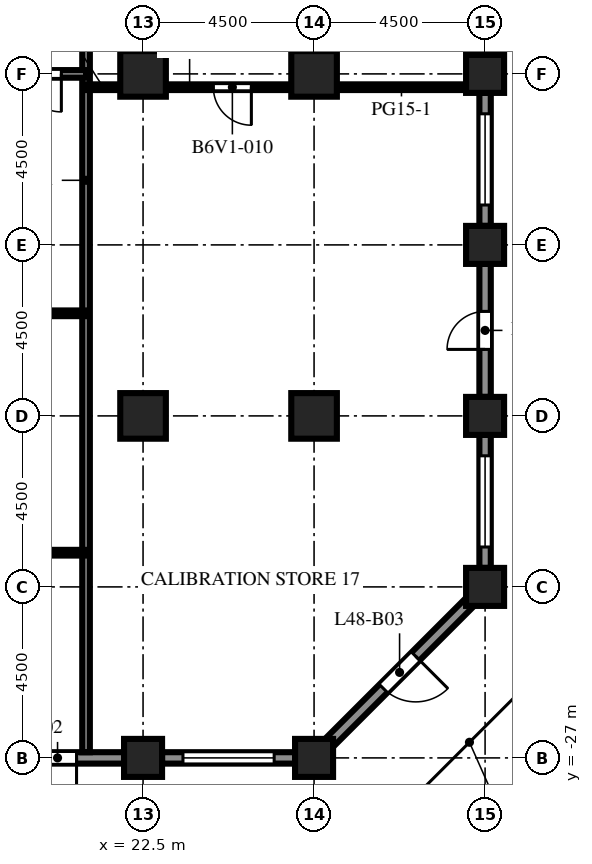
"""IFC4 building model, lengths in metres.
Left out: names, types, materials, properties, quantities, classifications, styles, units other than length and angle.
Written with IfcOpenShell. Run it as: python <this file> out.ifc"""

import sys

from ifc_helpers import new_model, si_unit, direction, frame, frame_2d, origin, origin_2d, place, context, subcontext, project, spatial, rectangle, extrude, element, fill, save


model = new_model("IFC4")
c1 = context("Model", 3, precision=1e-05, world=origin(), true_north=direction((0.0, 1.0)))
c2 = subcontext(c1, "Body", "Model", "MODEL_VIEW")
j1 = project(units=[si_unit("LENGTHUNIT", "METRE"), si_unit("PLANEANGLEUNIT", "RADIAN")], contexts=[c1])
p1 = place(None, origin())
s1 = spatial("IfcSite", under=j1, at=p1, CompositionType="ELEMENT")
p2 = place(p1, origin())
s2 = spatial("IfcBuilding", under=s1, at=p2, CompositionType="ELEMENT")
p3 = place(p2, frame((0.0, 0.0, 212.0)))
s3 = spatial("IfcBuildingStorey", under=s2, at=p3, CompositionType="ELEMENT", Elevation=212.0)
for number, where, z_axis, x_axis in (
    (1, (22.5, -27.0, 0.0), (0.0, 0.0, 1.0), (1.0, 0.0, 0.0)),
    (2, (27.0, -27.0, 0.0), (0.0, 0.0, 1.0), (1.0, 0.0, 0.0)),
    (3, (31.5, -22.5, 0.0), (0.0, 0.0, 1.0), (1.0, 0.0, 0.0)),
    (4, (31.5, -18.0, 0.0), (0.0, 0.0, 1.0), (1.0, 0.0, 0.0)),
    (5, (31.5, -13.5, 0.0), (0.0, 0.0, 1.0), (1.0, 0.0, 0.0)),
    (6, (31.5, -9.0, 0.0), (0.0, 0.0, 1.0), (1.0, 0.0, 0.0)),
):
    element("IfcColumn", number, at=place(p3, frame(where, z_axis=z_axis, x_axis=x_axis)), inside=s3, PredefinedType="COLUMN", context=c2, shape_type="SweptSolid", body=[
        extrude(rectangle(XDim=1.0, YDim=1.0, at=origin_2d()), origin(), (0.0, 0.0, 1.0), 4.1),
    ])
for number, where, z_axis, x_axis in (
    (7, (22.5, -18.0, 0.0), (0.0, 0.0, 1.0), (1.0, 0.0, 0.0)),
    (8, (22.5, -9.0, 0.0), (0.0, 0.0, 1.0), (1.0, 0.0, 0.0)),
    (9, (27.0, -18.0, 0.0), (0.0, 0.0, 1.0), (1.0, 0.0, 0.0)),
    (10, (27.0, -9.0, 0.0), (0.0, 0.0, 1.0), (1.0, 0.0, 0.0)),
):
    element("IfcColumn", number, at=place(p3, frame(where, z_axis=z_axis, x_axis=x_axis)), inside=s3, PredefinedType="COLUMN", context=c2, shape_type="SweptSolid", body=[
        extrude(rectangle(XDim=1.2, YDim=1.2, at=origin_2d()), origin(), (0.0, 0.0, 1.0), 4.1),
    ])
p4 = place(p3, frame((22.0, -27.0, 0.0), z_axis=(0.0, 0.0, 1.0), x_axis=(-1.0, 0.0, 0.0)))
e11 = element("IfcWall", 11, at=p4, inside=s3, PredefinedType="SOLIDWALL", context=c2, shape_type="SweptSolid", body=[
    extrude(rectangle(XDim=3.5, YDim=0.3, at=frame_2d((1.75, 0.0))), origin(), (0.0, 0.0, 1.0), 2.85),
])
p5 = place(p4, frame((1.25, 0.0, 0.0)))
e12 = element("IfcOpeningElement", 12, at=p5, cuts=e11, PredefinedType="OPENING", context=c2, shape_type="SweptSolid", body=[
    extrude(rectangle(XDim=1.0, YDim=2.2, at=frame_2d((0.5, 1.1))), frame((0.0, 0.16, 0.0), z_axis=(0.0, -1.0, 0.0), x_axis=(1.0, 0.0, 0.0)), (0.0, 0.0, 1.0), 0.32),
])
p6 = place(p3, frame((26.5, -27.0, 0.0), z_axis=(0.0, 0.0, 1.0), x_axis=(-1.0, 0.0, 0.0)))
e13 = element("IfcWall", 13, at=p6, inside=s3, PredefinedType="SOLIDWALL", context=c2, shape_type="SweptSolid", body=[
    extrude(rectangle(XDim=3.5, YDim=0.3, at=frame_2d((1.75, 0.0))), origin(), (0.0, 0.0, 1.0), 2.85),
])
p7 = place(p6, frame((0.55, 0.0, 0.8)))
e14 = element("IfcOpeningElement", 14, at=p7, cuts=e13, PredefinedType="OPENING", context=c2, shape_type="SweptSolid", body=[
    extrude(rectangle(XDim=2.4, YDim=1.7, at=frame_2d((1.2, 0.85))), frame((0.0, 0.16, 0.0), z_axis=(0.0, -1.0, 0.0), x_axis=(1.0, 0.0, 0.0)), (0.0, 0.0, 1.0), 0.32),
])
p8 = place(p3, frame((31.106, -22.894, 0.0), z_axis=(0.0, 0.0, 1.0), x_axis=(-0.707106781187, -0.707106781187, 0.0)))
e15 = element("IfcWall", 15, at=p8, inside=s3, PredefinedType="SOLIDWALL", context=c2, shape_type="SweptSolid", body=[
    extrude(rectangle(XDim=5.25, YDim=0.3, at=frame_2d((2.625, 0.0))), origin(), (0.0, 0.0, 1.0), 2.85),
])
p9 = place(p8, frame((2.025, 0.0, 0.0)))
e16 = element("IfcOpeningElement", 16, at=p9, cuts=e15, PredefinedType="OPENING", context=c2, shape_type="SweptSolid", body=[
    extrude(rectangle(XDim=1.2, YDim=2.2, at=frame_2d((0.6, 1.1))), frame((0.0, 0.16, 0.0), z_axis=(0.0, -1.0, 0.0), x_axis=(1.0, 0.0, 0.0)), (0.0, 0.0, 1.0), 0.32),
])
p10 = place(p3, frame((31.5, -18.5, 0.0), z_axis=(0.0, 0.0, 1.0), x_axis=(0.0, -1.0, 0.0)))
e17 = element("IfcWall", 17, at=p10, inside=s3, PredefinedType="SOLIDWALL", context=c2, shape_type="SweptSolid", body=[
    extrude(rectangle(XDim=3.5, YDim=0.3, at=frame_2d((1.75, 0.0))), origin(), (0.0, 0.0, 1.0), 2.85),
])
p11 = place(p10, frame((0.55, 0.0, 0.8)))
e18 = element("IfcOpeningElement", 18, at=p11, cuts=e17, PredefinedType="OPENING", context=c2, shape_type="SweptSolid", body=[
    extrude(rectangle(XDim=2.4, YDim=1.7, at=frame_2d((1.2, 0.85))), frame((0.0, 0.16, 0.0), z_axis=(0.0, -1.0, 0.0), x_axis=(1.0, 0.0, 0.0)), (0.0, 0.0, 1.0), 0.32),
])
p12 = place(p3, frame((31.5, -14.0, 0.0), z_axis=(0.0, 0.0, 1.0), x_axis=(0.0, -1.0, 0.0)))
e19 = element("IfcWall", 19, at=p12, inside=s3, PredefinedType="SOLIDWALL", context=c2, shape_type="SweptSolid", body=[
    extrude(rectangle(XDim=3.5, YDim=0.3, at=frame_2d((1.75, 0.0))), origin(), (0.0, 0.0, 1.0), 2.85),
])
p13 = place(p12, frame((1.25, 0.0, 0.0)))
e20 = element("IfcOpeningElement", 20, at=p13, cuts=e19, PredefinedType="OPENING", context=c2, shape_type="SweptSolid", body=[
    extrude(rectangle(XDim=1.0, YDim=2.2, at=frame_2d((0.5, 1.1))), frame((0.0, 0.16, 0.0), z_axis=(0.0, -1.0, 0.0), x_axis=(1.0, 0.0, 0.0)), (0.0, 0.0, 1.0), 0.32),
])
p14 = place(p3, frame((31.5, -9.5, 0.0), z_axis=(0.0, 0.0, 1.0), x_axis=(0.0, -1.0, 0.0)))
e21 = element("IfcWall", 21, at=p14, inside=s3, PredefinedType="SOLIDWALL", context=c2, shape_type="SweptSolid", body=[
    extrude(rectangle(XDim=3.5, YDim=0.3, at=frame_2d((1.75, 0.0))), origin(), (0.0, 0.0, 1.0), 2.85),
])
p15 = place(p14, frame((0.55, 0.0, 0.8)))
e22 = element("IfcOpeningElement", 22, at=p15, cuts=e21, PredefinedType="OPENING", context=c2, shape_type="SweptSolid", body=[
    extrude(rectangle(XDim=2.4, YDim=1.7, at=frame_2d((1.2, 0.85))), frame((0.0, 0.16, 0.0), z_axis=(0.0, -1.0, 0.0), x_axis=(1.0, 0.0, 0.0)), (0.0, 0.0, 1.0), 0.32),
])
p16 = place(p3, frame((31.5, -5.0, 0.0), z_axis=(0.0, 0.0, 1.0), x_axis=(0.0, -1.0, 0.0)))
e23 = element("IfcWall", 23, at=p16, inside=s3, PredefinedType="SOLIDWALL", context=c2, shape_type="SweptSolid", body=[
    extrude(rectangle(XDim=3.5, YDim=0.3, at=frame_2d((1.75, 0.0))), origin(), (0.0, 0.0, 1.0), 2.85),
])
p17 = place(p16, frame((0.55, 0.0, 0.8)))
e24 = element("IfcOpeningElement", 24, at=p17, cuts=e23, PredefinedType="OPENING", context=c2, shape_type="SweptSolid", body=[
    extrude(rectangle(XDim=2.4, YDim=1.7, at=frame_2d((1.2, 0.85))), frame((0.0, 0.16, 0.0), z_axis=(0.0, -1.0, 0.0), x_axis=(1.0, 0.0, 0.0)), (0.0, 0.0, 1.0), 0.32),
])
p18 = place(p3, frame((21.0, -26.85, 0.0), z_axis=(0.0, 0.0, 1.0), x_axis=(0.0, 1.0, 0.0)))
e25 = element("IfcWall", 25, at=p18, inside=s3, PredefinedType="PARTITIONING", context=c2, shape_type="SweptSolid", body=[
    extrude(rectangle(XDim=30.1, YDim=0.2, at=frame_2d((15.05, 0.0))), origin(), (0.0, 0.0, 1.0), 3.65),
])
p19 = place(p3, frame((21.0, -21.6, 0.0), z_axis=(0.0, 0.0, 1.0), x_axis=(-1.0, 0.0, 0.0)))
e26 = element("IfcWall", 26, at=p19, inside=s3, PredefinedType="PARTITIONING", context=c2, shape_type="SweptSolid", body=[
    extrude(rectangle(XDim=34.5, YDim=0.15, at=frame_2d((17.25, 0.0))), origin(), (0.0, 0.0, 1.0), 3.65),
])
p20 = place(p19, frame((29.9, 0.0, 0.0)))
e27 = element("IfcOpeningElement", 27, at=p20, cuts=e26, PredefinedType="OPENING", context=c2, shape_type="SweptSolid", body=[
    extrude(rectangle(XDim=1.0, YDim=2.1, at=frame_2d((0.5, 1.05))), frame((0.0, 0.085, 0.0), z_axis=(0.0, -1.0, 0.0), x_axis=(1.0, 0.0, 0.0)), (0.0, 0.0, 1.0), 0.17),
])
p21 = place(p19, frame((21.4, 0.0, 0.0)))
e28 = element("IfcOpeningElement", 28, at=p21, cuts=e26, PredefinedType="OPENING", context=c2, shape_type="SweptSolid", body=[
    extrude(rectangle(XDim=1.0, YDim=2.1, at=frame_2d((0.5, 1.05))), frame((0.0, 0.085, 0.0), z_axis=(0.0, -1.0, 0.0), x_axis=(1.0, 0.0, 0.0)), (0.0, 0.0, 1.0), 0.17),
])
p22 = place(p19, frame((13.15, 0.0, 0.0)))
e29 = element("IfcOpeningElement", 29, at=p22, cuts=e26, PredefinedType="OPENING", context=c2, shape_type="SweptSolid", body=[
    extrude(rectangle(XDim=1.0, YDim=2.1, at=frame_2d((0.5, 1.05))), frame((0.0, 0.085, 0.0), z_axis=(0.0, -1.0, 0.0), x_axis=(1.0, 0.0, 0.0)), (0.0, 0.0, 1.0), 0.17),
])
p23 = place(p19, frame((5.15, 0.0, 0.0)))
e30 = element("IfcOpeningElement", 30, at=p23, cuts=e26, PredefinedType="OPENING", context=c2, shape_type="SweptSolid", body=[
    extrude(rectangle(XDim=1.0, YDim=2.1, at=frame_2d((0.5, 1.05))), frame((0.0, 0.085, 0.0), z_axis=(0.0, -1.0, 0.0), x_axis=(1.0, 0.0, 0.0)), (0.0, 0.0, 1.0), 0.17),
])
p24 = place(p3, frame((21.0, -15.3, 0.0), z_axis=(0.0, 0.0, 1.0), x_axis=(-1.0, 0.0, 0.0)))
e31 = element("IfcWall", 31, at=p24, inside=s3, PredefinedType="PARTITIONING", context=c2, shape_type="SweptSolid", body=[
    extrude(rectangle(XDim=34.5, YDim=0.15, at=frame_2d((17.25, 0.0))), origin(), (0.0, 0.0, 1.0), 3.65),
])
p25 = place(p24, frame((28.9, 0.0, 0.0)))
e32 = element("IfcOpeningElement", 32, at=p25, cuts=e31, PredefinedType="OPENING", context=c2, shape_type="SweptSolid", body=[
    extrude(rectangle(XDim=1.0, YDim=2.1, at=frame_2d((0.5, 1.05))), frame((0.0, 0.085, 0.0), z_axis=(0.0, -1.0, 0.0), x_axis=(1.0, 0.0, 0.0)), (0.0, 0.0, 1.0), 0.17),
])
p26 = place(p24, frame((19.4, 0.0, 0.0)))
e33 = element("IfcOpeningElement", 33, at=p26, cuts=e31, PredefinedType="OPENING", context=c2, shape_type="SweptSolid", body=[
    extrude(rectangle(XDim=1.0, YDim=2.1, at=frame_2d((0.5, 1.05))), frame((0.0, 0.085, 0.0), z_axis=(0.0, -1.0, 0.0), x_axis=(1.0, 0.0, 0.0)), (0.0, 0.0, 1.0), 0.17),
])
p27 = place(p24, frame((14.15, 0.0, 0.0)))
e34 = element("IfcOpeningElement", 34, at=p27, cuts=e31, PredefinedType="OPENING", context=c2, shape_type="SweptSolid", body=[
    extrude(rectangle(XDim=1.0, YDim=2.1, at=frame_2d((0.5, 1.05))), frame((0.0, 0.085, 0.0), z_axis=(0.0, -1.0, 0.0), x_axis=(1.0, 0.0, 0.0)), (0.0, 0.0, 1.0), 0.17),
])
p28 = place(p24, frame((3.9, 0.0, 0.0)))
e35 = element("IfcOpeningElement", 35, at=p28, cuts=e31, PredefinedType="OPENING", context=c2, shape_type="SweptSolid", body=[
    extrude(rectangle(XDim=1.0, YDim=2.1, at=frame_2d((0.5, 1.05))), frame((0.0, 0.085, 0.0), z_axis=(0.0, -1.0, 0.0), x_axis=(1.0, 0.0, 0.0)), (0.0, 0.0, 1.0), 0.17),
])
p29 = place(p3, frame((21.0, -9.35, 0.0), z_axis=(0.0, 0.0, 1.0), x_axis=(1.0, 0.0, 0.0)))
e36 = element("IfcWall", 36, at=p29, inside=s3, PredefinedType="PARTITIONING", context=c2, shape_type="SweptSolid", body=[
    extrude(rectangle(XDim=0.9, YDim=0.15, at=frame_2d((0.45, 0.0))), origin(), (0.0, 0.0, 1.0), 3.65),
])
p30 = place(p3, frame((26.4, -9.35, 0.0), z_axis=(0.0, 0.0, 1.0), x_axis=(-1.0, 0.0, 0.0)))
e37 = element("IfcWall", 37, at=p30, inside=s3, PredefinedType="PARTITIONING", context=c2, shape_type="SweptSolid", body=[
    extrude(rectangle(XDim=3.3, YDim=0.15, at=frame_2d((1.65, 0.0))), origin(), (0.0, 0.0, 1.0), 3.65),
])
p31 = place(p30, frame((1.05, 0.0, 0.0)))
e38 = element("IfcOpeningElement", 38, at=p31, cuts=e37, PredefinedType="OPENING", context=c2, shape_type="SweptSolid", body=[
    extrude(rectangle(XDim=1.0, YDim=2.1, at=frame_2d((0.5, 1.05))), frame((0.0, 0.085, 0.0), z_axis=(0.0, -1.0, 0.0), x_axis=(1.0, 0.0, 0.0)), (0.0, 0.0, 1.0), 0.17),
])
p32 = place(p3, frame((27.6, -9.35, 0.0), z_axis=(0.0, 0.0, 1.0), x_axis=(1.0, 0.0, 0.0)))
e39 = element("IfcWall", 39, at=p32, inside=s3, PredefinedType="PARTITIONING", context=c2, shape_type="SweptSolid", body=[
    extrude(rectangle(XDim=3.4, YDim=0.15, at=frame_2d((1.7, 0.0))), origin(), (0.0, 0.0, 1.0), 3.65),
])
p33 = place(p3, frame((21.0, -9.0, 0.0), z_axis=(0.0, 0.0, 1.0), x_axis=(-1.0, 0.0, 0.0)))
e40 = element("IfcWall", 40, at=p33, inside=s3, PredefinedType="PARTITIONING", context=c2, shape_type="SweptSolid", body=[
    extrude(rectangle(XDim=3.0, YDim=0.2, at=frame_2d((1.5, 0.0))), origin(), (0.0, 0.0, 1.0), 3.65),
])
p34 = place(p33, frame((0.65, 0.0, 0.0)))
e41 = element("IfcOpeningElement", 41, at=p34, cuts=e40, PredefinedType="OPENING", context=c2, shape_type="SweptSolid", body=[
    extrude(rectangle(XDim=1.0, YDim=2.1, at=frame_2d((0.5, 1.05))), frame((0.0, 0.11, 0.0), z_axis=(0.0, -1.0, 0.0), x_axis=(1.0, 0.0, 0.0)), (0.0, 0.0, 1.0), 0.22),
])
p35 = place(p5, origin())
e42 = element("IfcDoor", 42, at=p35, inside=s3, OperationType="SINGLE_SWING_LEFT", PredefinedType="DOOR", context=c2, shape_type="SweptSolid", body=[
    extrude(rectangle(XDim=1.0, YDim=2.2, at=frame_2d((0.5, 1.1))), frame((0.0, 0.025, 0.0), z_axis=(0.0, -1.0, 0.0), x_axis=(1.0, 0.0, 0.0)), (0.0, 0.0, 1.0), 0.05),
])
fill(e12, e42)
p36 = place(p7, origin())
e43 = element("IfcWindow", 43, at=p36, inside=s3, PartitioningType="SINGLE_PANEL", PredefinedType="WINDOW", context=c2, shape_type="SweptSolid", body=[
    extrude(rectangle(XDim=2.4, YDim=1.7, at=frame_2d((1.2, 0.85))), frame((0.0, 0.03, 0.0), z_axis=(0.0, -1.0, 0.0), x_axis=(1.0, 0.0, 0.0)), (0.0, 0.0, 1.0), 0.06),
])
fill(e14, e43)
p37 = place(p9, origin())
e44 = element("IfcDoor", 44, at=p37, inside=s3, OperationType="SINGLE_SWING_LEFT", PredefinedType="DOOR", context=c2, shape_type="SweptSolid", body=[
    extrude(rectangle(XDim=1.2, YDim=2.2, at=frame_2d((0.6, 1.1))), frame((0.0, 0.025, 0.0), z_axis=(0.0, -1.0, 0.0), x_axis=(1.0, 0.0, 0.0)), (0.0, 0.0, 1.0), 0.05),
])
fill(e16, e44)
p38 = place(p11, origin())
e45 = element("IfcWindow", 45, at=p38, inside=s3, PartitioningType="SINGLE_PANEL", PredefinedType="WINDOW", context=c2, shape_type="SweptSolid", body=[
    extrude(rectangle(XDim=2.4, YDim=1.7, at=frame_2d((1.2, 0.85))), frame((0.0, 0.03, 0.0), z_axis=(0.0, -1.0, 0.0), x_axis=(1.0, 0.0, 0.0)), (0.0, 0.0, 1.0), 0.06),
])
fill(e18, e45)
p39 = place(p13, origin())
e46 = element("IfcDoor", 46, at=p39, inside=s3, OperationType="SINGLE_SWING_RIGHT", PredefinedType="DOOR", context=c2, shape_type="SweptSolid", body=[
    extrude(rectangle(XDim=1.0, YDim=2.2, at=frame_2d((0.5, 1.1))), frame((0.0, 0.025, 0.0), z_axis=(0.0, -1.0, 0.0), x_axis=(1.0, 0.0, 0.0)), (0.0, 0.0, 1.0), 0.05),
])
fill(e20, e46)
p40 = place(p15, origin())
e47 = element("IfcWindow", 47, at=p40, inside=s3, PartitioningType="SINGLE_PANEL", PredefinedType="WINDOW", context=c2, shape_type="SweptSolid", body=[
    extrude(rectangle(XDim=2.4, YDim=1.7, at=frame_2d((1.2, 0.85))), frame((0.0, 0.03, 0.0), z_axis=(0.0, -1.0, 0.0), x_axis=(1.0, 0.0, 0.0)), (0.0, 0.0, 1.0), 0.06),
])
fill(e22, e47)
p41 = place(p31, origin())
e48 = element("IfcDoor", 48, at=p41, inside=s3, OperationType="SINGLE_SWING_LEFT", PredefinedType="DOOR", context=c2, shape_type="SweptSolid", body=[
    extrude(rectangle(XDim=1.0, YDim=2.1, at=frame_2d((0.5, 1.05))), frame((0.0, 0.025, 0.0), z_axis=(0.0, -1.0, 0.0), x_axis=(1.0, 0.0, 0.0)), (0.0, 0.0, 1.0), 0.05),
])
fill(e38, e48)
p42 = place(p34, origin())
e49 = element("IfcDoor", 49, at=p42, inside=s3, OperationType="SINGLE_SWING_LEFT", PredefinedType="DOOR", context=c2, shape_type="SweptSolid", body=[
    extrude(rectangle(XDim=1.0, YDim=2.1, at=frame_2d((0.5, 1.05))), frame((0.0, 0.025, 0.0), z_axis=(0.0, -1.0, 0.0), x_axis=(1.0, 0.0, 0.0)), (0.0, 0.0, 1.0), 0.05),
])
fill(e41, e49)
save(model, sys.argv[1])
